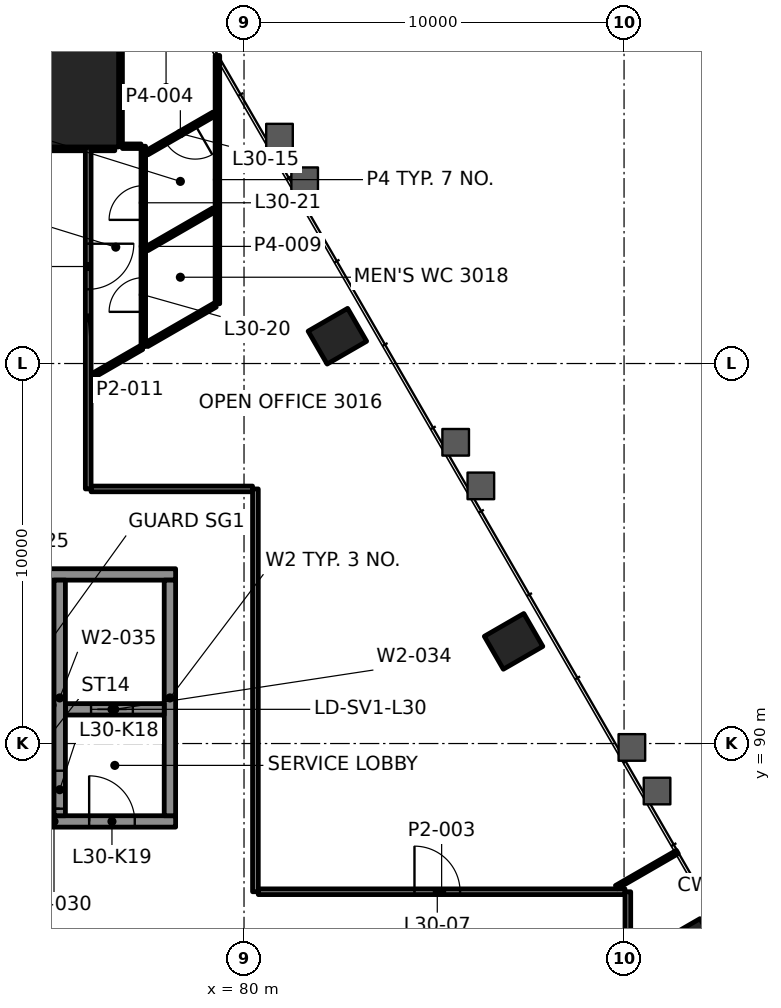
"""IFC4 building model, lengths in metres.
Left out: names, types, materials, properties, quantities, classifications, styles, units other than length and angle.
Written with IfcOpenShell. Run it as: python <this file> out.ifc"""

import sys

from ifc_helpers import new_model, si_unit, direction, frame, frame_2d, origin, origin_2d, place, context, subcontext, project, spatial, rectangle, extrude, element, fill, save


model = new_model("IFC4")
c1 = context("Model", 3, precision=1e-05, world=origin(), true_north=direction((0.0, 1.0)))
c2 = subcontext(c1, "Body", "Model", "MODEL_VIEW")
j1 = project(units=[si_unit("LENGTHUNIT", "METRE"), si_unit("PLANEANGLEUNIT", "RADIAN")], contexts=[c1])
p1 = place(None, origin())
s1 = spatial("IfcSite", under=j1, at=p1, CompositionType="ELEMENT")
p2 = place(p1, origin())
s2 = spatial("IfcBuilding", under=s1, at=p2, CompositionType="ELEMENT")
p3 = place(p2, frame((0.0, 0.0, 132.4)))
s3 = spatial("IfcBuildingStorey", under=s2, at=p3, CompositionType="ELEMENT", Elevation=132.4)
p4 = place(p3, frame((75.0, 107.399, 0.0), z_axis=(0.0, 0.0, 1.0), x_axis=(-1.0, 0.0, 0.0)))
e1 = element("IfcColumn", 1, at=p4, inside=s3, PredefinedType="COLUMN", context=c2, shape_type="SweptSolid", body=[
    extrude(rectangle(XDim=3.4, YDim=3.4, at=origin_2d()), origin(), (0.0, 0.0, 1.0), 4.2),
])
for number, where, z_axis, x_axis in (
    (2, (91.729, 84.658, -0.0), (0.0, 0.0, 1.0), (-0.5, 0.866, 0.0)),
    (3, (87.093, 92.688, -0.0), (0.0, 0.0, 1.0), (-0.5, 0.866, 0.0)),
    (4, (82.457, 100.719, -0.0), (0.0, 0.0, 1.0), (-0.5, 0.866, 0.0)),
):
    element("IfcColumn", number, at=place(p3, frame(where, z_axis=z_axis, x_axis=x_axis)), inside=s3, PredefinedType="COLUMN", context=c2, shape_type="SweptSolid", body=[
        extrude(rectangle(XDim=1.0, YDim=1.2, at=origin_2d()), origin(), (0.0, 0.0, 1.0), 4.2),
    ])
p5 = place(p3, frame((71.8, 87.95, 0.0), z_axis=(0.0, 0.0, 1.0), x_axis=(1.0, 0.0, 0.0)))
e5 = element("IfcWall", 5, at=p5, inside=s3, PredefinedType="SHEAR", context=c2, shape_type="SweptSolid", body=[
    extrude(rectangle(XDim=6.4, YDim=0.3, at=frame_2d((3.2, 0.0))), origin(), (0.0, 0.0, 1.0), 4.0),
])
p6 = place(p5, frame((1.325, 0.0, 0.0)))
e6 = element("IfcOpeningElement", 6, at=p6, cuts=e5, PredefinedType="OPENING", context=c2, shape_type="SweptSolid", body=[
    extrude(rectangle(XDim=1.0, YDim=2.1, at=frame_2d((0.5, 1.05))), frame((0.0, 0.16, 0.0), z_axis=(0.0, -1.0, 0.0), x_axis=(1.0, 0.0, 0.0)), (0.0, 0.0, 1.0), 0.32),
])
p7 = place(p5, frame((4.125, 0.0, 0.0)))
e7 = element("IfcOpeningElement", 7, at=p7, cuts=e5, PredefinedType="OPENING", context=c2, shape_type="SweptSolid", body=[
    extrude(rectangle(XDim=1.2, YDim=2.1, at=frame_2d((0.6, 1.05))), frame((0.0, 0.16, 0.0), z_axis=(0.0, -1.0, 0.0), x_axis=(1.0, 0.0, 0.0)), (0.0, 0.0, 1.0), 0.32),
])
p8 = place(p3, frame((71.8, 94.45, 0.0), z_axis=(0.0, 0.0, 1.0), x_axis=(1.0, 0.0, 0.0)))
e8 = element("IfcWall", 8, at=p8, inside=s3, PredefinedType="SHEAR", context=c2, shape_type="SweptSolid", body=[
    extrude(rectangle(XDim=6.4, YDim=0.3, at=frame_2d((3.2, 0.0))), origin(), (0.0, 0.0, 1.0), 4.0),
])
p9 = place(p3, frame((78.05, 88.1, 0.0), z_axis=(0.0, 0.0, 1.0), x_axis=(0.0, 1.0, 0.0)))
e9 = element("IfcWall", 9, at=p9, inside=s3, PredefinedType="SHEAR", context=c2, shape_type="SweptSolid", body=[
    extrude(rectangle(XDim=6.2, YDim=0.3, at=frame_2d((3.1, 0.0))), origin(), (0.0, 0.0, 1.0), 4.0),
])
p10 = place(p3, frame((75.3, 90.9, 0.0), z_axis=(0.0, 0.0, 1.0), x_axis=(1.0, 0.0, 0.0)))
e10 = element("IfcWall", 10, at=p10, inside=s3, PredefinedType="SHEAR", context=c2, shape_type="SweptSolid", body=[
    extrude(rectangle(XDim=2.6, YDim=0.3, at=frame_2d((1.3, 0.0))), origin(), (0.0, 0.0, 1.0), 4.0),
])
p11 = place(p10, frame((0.675, 0.0, 0.0)))
e11 = element("IfcOpeningElement", 11, at=p11, cuts=e10, PredefinedType="OPENING", context=c2, shape_type="SweptSolid", body=[
    extrude(rectangle(XDim=1.1, YDim=2.1, at=frame_2d((0.55, 1.05))), frame((0.0, 0.16, 0.0), z_axis=(0.0, -1.0, 0.0), x_axis=(1.0, 0.0, 0.0)), (0.0, 0.0, 1.0), 0.32),
])
p12 = place(p3, frame((75.15, 88.1, 0.0), z_axis=(0.0, 0.0, 1.0), x_axis=(0.0, 1.0, 0.0)))
e12 = element("IfcWall", 12, at=p12, inside=s3, PredefinedType="SHEAR", context=c2, shape_type="SweptSolid", body=[
    extrude(rectangle(XDim=6.2, YDim=0.3, at=frame_2d((3.1, 0.0))), origin(), (0.0, 0.0, 1.0), 4.0),
])
p13 = place(p12, frame((0.185, 0.0, 0.0)))
e13 = element("IfcOpeningElement", 13, at=p13, cuts=e12, PredefinedType="OPENING", context=c2, shape_type="SweptSolid", body=[
    extrude(rectangle(XDim=1.0, YDim=2.1, at=frame_2d((0.5, 1.05))), frame((0.0, 0.16, 0.0), z_axis=(0.0, -1.0, 0.0), x_axis=(1.0, 0.0, 0.0)), (0.0, 0.0, 1.0), 0.32),
])
p14 = place(p3, frame((80.375, 86.1, 0.0), z_axis=(0.0, 0.0, 1.0), x_axis=(1.0, 0.0, 0.0)))
e14 = element("IfcWall", 14, at=p14, inside=s3, PredefinedType="PARTITIONING", context=c2, shape_type="SweptSolid", body=[
    extrude(rectangle(XDim=9.649, YDim=0.15, at=frame_2d((4.825, 0.0))), origin(), (0.0, 0.0, 1.0), 3.4),
])
p15 = place(p14, frame((4.11, 0.0, 0.0)))
e15 = element("IfcOpeningElement", 15, at=p15, cuts=e14, PredefinedType="OPENING", context=c2, shape_type="SweptSolid", body=[
    extrude(rectangle(XDim=1.2, YDim=2.1, at=frame_2d((0.6, 1.05))), frame((0.0, 0.085, 0.0), z_axis=(0.0, -1.0, 0.0), x_axis=(1.0, 0.0, 0.0)), (0.0, 0.0, 1.0), 0.17),
])
p16 = place(p3, frame((75.975, 96.7, 0.0), z_axis=(0.0, 0.0, 1.0), x_axis=(1.0, 0.0, 0.0)))
e16 = element("IfcWall", 16, at=p16, inside=s3, PredefinedType="PARTITIONING", context=c2, shape_type="SweptSolid", body=[
    extrude(rectangle(XDim=4.249, YDim=0.15, at=frame_2d((2.125, 0.0))), origin(), (0.0, 0.0, 1.0), 3.4),
])
p17 = place(p3, frame((74.176, 105.699, 0.0), z_axis=(0.0, 0.0, 1.0), x_axis=(1.0, 0.0, 0.0)))
e17 = element("IfcWall", 17, at=p17, inside=s3, PredefinedType="PARTITIONING", context=c2, shape_type="SweptSolid", body=[
    extrude(rectangle(XDim=1.649, YDim=0.2, at=frame_2d((0.825, 0.0))), origin(), (0.0, 0.0, 1.0), 3.397),
])
p18 = place(p3, frame((76.8, 105.718, 0.0), z_axis=(0.0, 0.0, 1.0), x_axis=(1.0, 0.0, 0.0)))
e18 = element("IfcWall", 18, at=p18, inside=s3, PredefinedType="PARTITIONING", context=c2, shape_type="SweptSolid", body=[
    extrude(rectangle(XDim=0.49, YDim=0.12, at=frame_2d((0.245, 0.0))), origin(), (0.0, 0.0, 1.0), 3.4),
])
p19 = place(p3, frame((89.797, 86.22, 0.0), z_axis=(0.0, 0.0, 1.0), x_axis=(0.866036320872, 0.499981090573, 0.0)))
e19 = element("IfcWall", 19, at=p19, inside=s3, PredefinedType="PARTITIONING", context=c2, shape_type="SweptSolid", body=[
    extrude(rectangle(XDim=1.852, YDim=0.1, at=frame_2d((0.926, 0.0))), origin(), (0.0, 0.0, 1.0), 3.165),
])
p20 = place(p3, frame((76.01, 99.673, 0.0), z_axis=(0.0, 0.0, 1.0), x_axis=(0.865943626461, 0.500141615736, 0.0)))
e20 = element("IfcWall", 20, at=p20, inside=s3, PredefinedType="PARTITIONING", context=c2, shape_type="SweptSolid", body=[
    extrude(rectangle(XDim=1.496, YDim=0.12, at=frame_2d((0.748, 0.0))), origin(), (0.0, 0.0, 1.0), 3.4),
])
p21 = place(p3, frame((77.445, 103.024, 0.0), z_axis=(0.0, 0.0, 1.0), x_axis=(0.866039589866, 0.499975428181, 0.0)))
e21 = element("IfcWall", 21, at=p21, inside=s3, PredefinedType="PARTITIONING", context=c2, shape_type="SweptSolid", body=[
    extrude(rectangle(XDim=2.033, YDim=0.12, at=frame_2d((1.016, 0.0))), origin(), (0.0, 0.0, 1.0), 3.4),
])
p22 = place(p3, frame((79.205, 106.562, 0.0), z_axis=(0.0, 0.0, 1.0), x_axis=(-0.866017611601, -0.500013496215, 0.0)))
e22 = element("IfcWall", 22, at=p22, inside=s3, PredefinedType="PARTITIONING", context=c2, shape_type="SweptSolid", body=[
    extrude(rectangle(XDim=2.033, YDim=0.12, at=frame_2d((1.017, 0.0))), origin(), (0.0, 0.0, 1.0), 3.4),
])
p23 = place(p22, frame((0.567, 0.0, 0.0)))
e23 = element("IfcOpeningElement", 23, at=p23, cuts=e22, PredefinedType="OPENING", context=c2, shape_type="SweptSolid", body=[
    extrude(rectangle(XDim=0.9, YDim=2.1, at=frame_2d((0.45, 1.05))), frame((0.0, 0.07, 0.0), z_axis=(0.0, -1.0, 0.0), x_axis=(1.0, 0.0, 0.0)), (0.0, 0.0, 1.0), 0.14),
])
p24 = place(p3, frame((90.1, 86.1, 0.0), z_axis=(0.0, 0.0, 1.0), x_axis=(0.0, -1.0, 0.0)))
e24 = element("IfcWall", 24, at=p24, inside=s3, PredefinedType="PARTITIONING", context=c2, shape_type="SweptSolid", body=[
    extrude(rectangle(XDim=18.778, YDim=0.15, at=frame_2d((9.389, 0.0))), origin(), (0.0, 0.0, 1.0), 3.4),
])
p25 = place(p24, frame((6.196, 0.0, 0.0)))
e25 = element("IfcOpeningElement", 25, at=p25, cuts=e24, PredefinedType="OPENING", context=c2, shape_type="SweptSolid", body=[
    extrude(rectangle(XDim=0.9, YDim=2.1, at=frame_2d((0.45, 1.05))), frame((0.0, 0.085, 0.0), z_axis=(0.0, -1.0, 0.0), x_axis=(1.0, 0.0, 0.0)), (0.0, 0.0, 1.0), 0.17),
])
p26 = place(p24, frame((15.332, 0.0, 0.0)))
e26 = element("IfcOpeningElement", 26, at=p26, cuts=e24, PredefinedType="OPENING", context=c2, shape_type="SweptSolid", body=[
    extrude(rectangle(XDim=1.0, YDim=2.1, at=frame_2d((0.5, 1.05))), frame((0.0, 0.085, 0.0), z_axis=(0.0, -1.0, 0.0), x_axis=(1.0, 0.0, 0.0)), (0.0, 0.0, 1.0), 0.17),
])
p27 = place(p3, frame((80.3, 86.1, 0.0), z_axis=(0.0, 0.0, 1.0), x_axis=(0.0, 1.0, 0.0)))
e27 = element("IfcWall", 27, at=p27, inside=s3, PredefinedType="PARTITIONING", context=c2, shape_type="SweptSolid", body=[
    extrude(rectangle(XDim=10.599, YDim=0.15, at=frame_2d((5.3, 0.0))), origin(), (0.0, 0.0, 1.0), 3.322),
])
p28 = place(p3, frame((79.3, 101.573, 0.0), z_axis=(0.0, 0.0, 1.0), x_axis=(0.0, 1.0, 0.0)))
e28 = element("IfcWall", 28, at=p28, inside=s3, PredefinedType="PARTITIONING", context=c2, shape_type="SweptSolid", body=[
    extrude(rectangle(XDim=6.533, YDim=0.12, at=frame_2d((3.267, 0.0))), origin(), (0.0, 0.0, 1.0), 3.4),
])
p29 = place(p3, frame((77.35, 100.447, 0.0), z_axis=(0.0, 0.0, 1.0), x_axis=(0.0, 1.0, 0.0)))
e29 = element("IfcWall", 29, at=p29, inside=s3, PredefinedType="PARTITIONING", context=c2, shape_type="SweptSolid", body=[
    extrude(rectangle(XDim=5.271, YDim=0.12, at=frame_2d((2.635, 0.0))), origin(), (0.0, 0.0, 1.0), 3.4),
])
p30 = place(p29, frame((0.913, 0.0, 0.0)))
e30 = element("IfcOpeningElement", 30, at=p30, cuts=e29, PredefinedType="OPENING", context=c2, shape_type="SweptSolid", body=[
    extrude(rectangle(XDim=0.9, YDim=2.1, at=frame_2d((0.45, 1.05))), frame((0.0, 0.07, 0.0), z_axis=(0.0, -1.0, 0.0), x_axis=(1.0, 0.0, 0.0)), (0.0, 0.0, 1.0), 0.14),
])
p31 = place(p29, frame((3.333, 0.0, 0.0)))
e31 = element("IfcOpeningElement", 31, at=p31, cuts=e29, PredefinedType="OPENING", context=c2, shape_type="SweptSolid", body=[
    extrude(rectangle(XDim=0.9, YDim=2.1, at=frame_2d((0.45, 1.05))), frame((0.0, 0.07, 0.0), z_axis=(0.0, -1.0, 0.0), x_axis=(1.0, 0.0, 0.0)), (0.0, 0.0, 1.0), 0.14),
])
p32 = place(p3, frame((76.7, 105.715, 0.0), z_axis=(0.0, 0.0, 1.0), x_axis=(0.0, 1.0, 0.0)))
e32 = element("IfcWall", 32, at=p32, inside=s3, PredefinedType="PARTITIONING", context=c2, shape_type="SweptSolid", body=[
    extrude(rectangle(XDim=3.543, YDim=0.2, at=frame_2d((1.772, 0.0))), origin(), (0.0, 0.0, 1.0), 3.4),
])
p33 = place(p3, frame((75.9, 105.698, 0.0), z_axis=(0.0, 0.0, 1.0), x_axis=(0.0, -1.0, 0.0)))
e33 = element("IfcWall", 33, at=p33, inside=s3, PredefinedType="PARTITIONING", context=c2, shape_type="SweptSolid", body=[
    extrude(rectangle(XDim=8.999, YDim=0.15, at=frame_2d((4.499, 0.0))), origin(), (0.0, 0.0, 1.0), 3.4),
])
p34 = place(p33, frame((2.546, 0.0, 0.0)))
e34 = element("IfcOpeningElement", 34, at=p34, cuts=e33, PredefinedType="OPENING", context=c2, shape_type="SweptSolid", body=[
    extrude(rectangle(XDim=1.2, YDim=2.1, at=frame_2d((0.6, 1.05))), frame((0.0, 0.085, 0.0), z_axis=(0.0, -1.0, 0.0), x_axis=(1.0, 0.0, 0.0)), (0.0, 0.0, 1.0), 0.17),
])
p35 = place(p3, frame((75.975, 105.699, 0.0), z_axis=(0.0, 0.0, 1.0), x_axis=(1.0, 0.0, 0.0)))
e35 = element("IfcWall", 35, at=p35, inside=s3, PredefinedType="PARTITIONING", context=c2, shape_type="SweptSolid", body=[
    extrude(rectangle(XDim=0.625, YDim=0.2, at=frame_2d((0.312, 0.0))), origin(), (0.0, 0.0, 1.0), 3.4),
])
p36 = place(p3, frame((77.44, 100.499, 0.0), z_axis=(0.0, 0.0, 1.0), x_axis=(0.865986040326, 0.500068173313, 0.0)))
e36 = element("IfcWall", 36, at=p36, inside=s3, PredefinedType="PARTITIONING", context=c2, shape_type="SweptSolid", body=[
    extrude(rectangle(XDim=2.078, YDim=0.12, at=frame_2d((1.039, 0.0))), origin(), (0.0, 0.0, 1.0), 3.4),
])
p37 = place(p15, origin())
e37 = element("IfcDoor", 37, at=p37, inside=s3, OperationType="DOUBLE_DOOR_SINGLE_SWING", PredefinedType="DOOR", context=c2, shape_type="SweptSolid", body=[
    extrude(rectangle(XDim=1.2, YDim=2.1, at=frame_2d((0.6, 1.05))), frame((0.0, 0.025, 0.0), z_axis=(0.0, -1.0, 0.0), x_axis=(1.0, 0.0, 0.0)), (0.0, 0.0, 1.0), 0.05),
])
fill(e15, e37)
p38 = place(p23, origin())
e38 = element("IfcDoor", 38, at=p38, inside=s3, OperationType="SINGLE_SWING_RIGHT", PredefinedType="DOOR", context=c2, shape_type="SweptSolid", body=[
    extrude(rectangle(XDim=0.9, YDim=2.1, at=frame_2d((0.45, 1.05))), frame((0.0, 0.025, 0.0), z_axis=(0.0, -1.0, 0.0), x_axis=(1.0, 0.0, 0.0)), (0.0, 0.0, 1.0), 0.05),
])
fill(e23, e38)
p39 = place(p30, origin())
e39 = element("IfcDoor", 39, at=p39, inside=s3, OperationType="SINGLE_SWING_LEFT", PredefinedType="DOOR", context=c2, shape_type="SweptSolid", body=[
    extrude(rectangle(XDim=0.9, YDim=2.1, at=frame_2d((0.45, 1.05))), frame((0.0, 0.025, 0.0), z_axis=(0.0, -1.0, 0.0), x_axis=(1.0, 0.0, 0.0)), (0.0, 0.0, 1.0), 0.05),
])
fill(e30, e39)
p40 = place(p31, origin())
e40 = element("IfcDoor", 40, at=p40, inside=s3, OperationType="SINGLE_SWING_RIGHT", PredefinedType="DOOR", context=c2, shape_type="SweptSolid", body=[
    extrude(rectangle(XDim=0.9, YDim=2.1, at=frame_2d((0.45, 1.05))), frame((0.0, 0.025, 0.0), z_axis=(0.0, -1.0, 0.0), x_axis=(1.0, 0.0, 0.0)), (0.0, 0.0, 1.0), 0.05),
])
fill(e31, e40)
p41 = place(p34, origin())
e41 = element("IfcDoor", 41, at=p41, inside=s3, OperationType="DOUBLE_DOOR_SINGLE_SWING", PredefinedType="DOOR", context=c2, shape_type="SweptSolid", body=[
    extrude(rectangle(XDim=1.2, YDim=2.1, at=frame_2d((0.6, 1.05))), frame((0.0, 0.025, 0.0), z_axis=(0.0, -1.0, 0.0), x_axis=(1.0, 0.0, 0.0)), (0.0, 0.0, 1.0), 0.05),
])
fill(e34, e41)
p42 = place(p11, origin())
e42 = element("IfcDoor", 42, at=p42, inside=s3, OperationType="DOUBLE_DOOR_SLIDING", PredefinedType="DOOR", context=c2, shape_type="SweptSolid", body=[
    extrude(rectangle(XDim=1.1, YDim=2.1, at=frame_2d((0.55, 1.05))), frame((0.0, 0.025, 0.0), z_axis=(0.0, -1.0, 0.0), x_axis=(1.0, 0.0, 0.0)), (0.0, 0.0, 1.0), 0.05),
])
fill(e11, e42)
p43 = place(p13, origin())
e43 = element("IfcDoor", 43, at=p43, inside=s3, OperationType="SINGLE_SWING_LEFT", PredefinedType="DOOR", context=c2, shape_type="SweptSolid", body=[
    extrude(rectangle(XDim=1.0, YDim=2.1, at=frame_2d((0.5, 1.05))), frame((0.0, 0.025, 0.0), z_axis=(0.0, -1.0, 0.0), x_axis=(1.0, 0.0, 0.0)), (0.0, 0.0, 1.0), 0.05),
])
fill(e13, e43)
p44 = place(p7, origin())
e44 = element("IfcDoor", 44, at=p44, inside=s3, OperationType="SINGLE_SWING_RIGHT", PredefinedType="DOOR", context=c2, shape_type="SweptSolid", body=[
    extrude(rectangle(XDim=1.2, YDim=2.1, at=frame_2d((0.6, 1.05))), frame((0.0, 0.025, 0.0), z_axis=(0.0, -1.0, 0.0), x_axis=(1.0, 0.0, 0.0)), (0.0, 0.0, 1.0), 0.05),
])
fill(e7, e44)
save(model, sys.argv[1])
